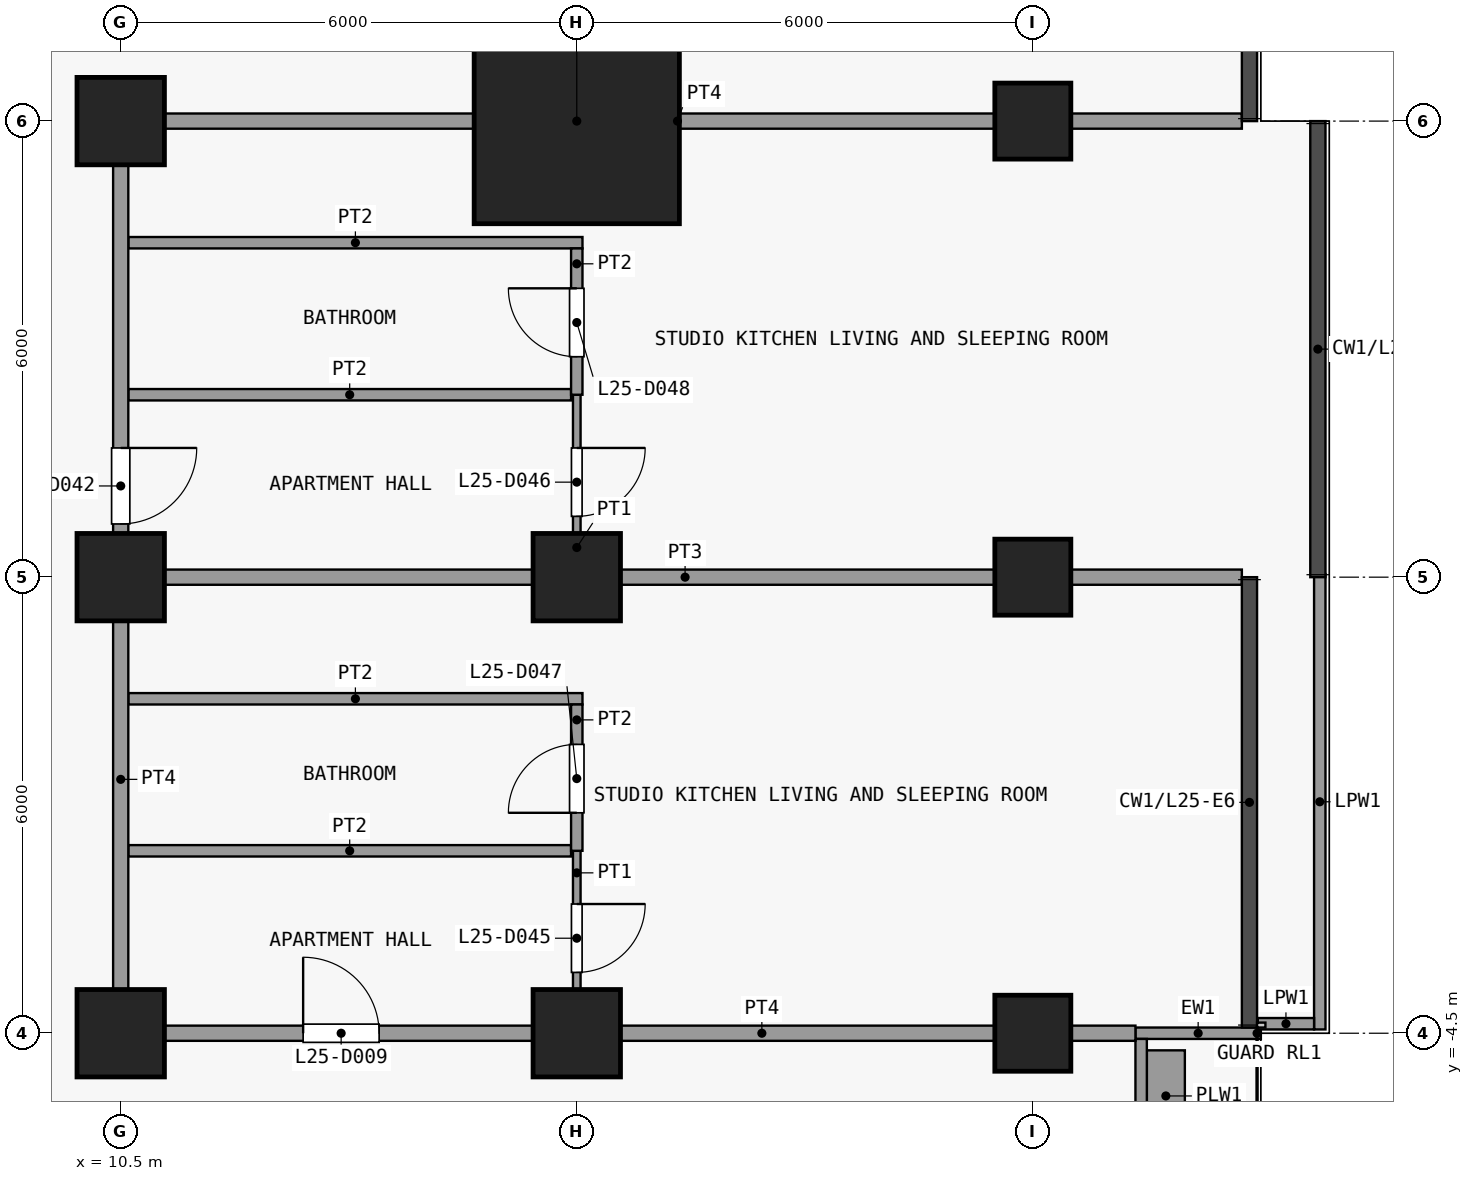
"""IFC4 building model, lengths in metres.
Left out: names, types, materials, properties, quantities, classifications, styles, units other than length and angle.
Written with IfcOpenShell. Run it as: python <this file> out.ifc"""

import sys

from ifc_helpers import new_model, si_unit, direction, frame, frame_2d, origin, origin_2d, place, context, subcontext, project, spatial, rectangle, extrude, element, fill, save


model = new_model("IFC4")
c1 = context("Model", 3, precision=1e-05, world=origin(), true_north=direction((0.0, 1.0)))
c2 = subcontext(c1, "Body", "Model", "MODEL_VIEW")
j1 = project(units=[si_unit("LENGTHUNIT", "METRE"), si_unit("PLANEANGLEUNIT", "RADIAN")], contexts=[c1])
p1 = place(None, origin())
s1 = spatial("IfcSite", under=j1, at=p1, CompositionType="ELEMENT")
p2 = place(p1, origin())
s2 = spatial("IfcBuilding", under=s1, at=p2, CompositionType="ELEMENT")
p3 = place(p2, frame((0.0, 0.0, 102.7)))
s3 = spatial("IfcBuildingStorey", under=s2, at=p3, CompositionType="ELEMENT", Elevation=102.7)
for number, where, z_axis, x_axis in (
    (1, (10.5, -4.5, 0.0), (0.0, 0.0, 1.0), (1.0, 0.0, 0.0)),
    (2, (10.5, 1.5, 0.0), (0.0, 0.0, 1.0), (1.0, 0.0, 0.0)),
    (3, (10.5, 7.5, 0.0), (0.0, 0.0, 1.0), (1.0, 0.0, 0.0)),
    (4, (16.5, -4.5, 0.0), (0.0, 0.0, 1.0), (1.0, 0.0, 0.0)),
    (5, (16.5, 1.5, 0.0), (0.0, 0.0, 1.0), (1.0, 0.0, 0.0)),
):
    element("IfcColumn", number, at=place(p3, frame(where, z_axis=z_axis, x_axis=x_axis)), inside=s3, PredefinedType="COLUMN", context=c2, shape_type="SweptSolid", body=[
        extrude(rectangle(XDim=1.15, YDim=1.15, at=origin_2d()), origin(), (0.0, 0.0, 1.0), 3.6),
    ])
p4 = place(p3, frame((16.5, 7.5, 0.0), z_axis=(0.0, 0.0, 1.0), x_axis=(1.0, 0.0, 0.0)))
e6 = element("IfcColumn", 6, at=p4, inside=s3, PredefinedType="COLUMN", context=c2, shape_type="SweptSolid", body=[
    extrude(rectangle(XDim=2.7, YDim=2.7, at=origin_2d()), origin(), (0.0, 0.0, 1.0), 3.6),
])
for number, where, z_axis, x_axis in (
    (7, (22.5, -4.5, 0.0), (0.0, 0.0, 1.0), (1.0, 0.0, 0.0)),
    (8, (22.5, 1.5, 0.0), (0.0, 0.0, 1.0), (1.0, 0.0, 0.0)),
    (9, (22.5, 7.5, 0.0), (0.0, 0.0, 1.0), (1.0, 0.0, 0.0)),
):
    element("IfcColumn", number, at=place(p3, frame(where, z_axis=z_axis, x_axis=x_axis)), inside=s3, PredefinedType="COLUMN", context=c2, shape_type="SweptSolid", body=[
        extrude(rectangle(XDim=1.0, YDim=1.0, at=origin_2d()), origin(), (0.0, 0.0, 1.0), 3.6),
    ])
p5 = place(p3, frame((23.85, -4.5, 0.0), z_axis=(0.0, 0.0, 1.0), x_axis=(1.0, 0.0, 0.0)))
e10 = element("IfcWall", 10, at=p5, inside=s3, PredefinedType="SOLIDWALL", context=c2, shape_type="SweptSolid", body=[
    extrude(rectangle(XDim=1.65, YDim=0.15, at=frame_2d((0.825, 0.0))), origin(), (0.0, 0.0, 1.0), 3.3),
])
p6 = place(p3, frame((23.925, -4.575, 0.0), z_axis=(0.0, 0.0, 1.0), x_axis=(0.0, -1.0, 0.0)))
e11 = element("IfcWall", 11, at=p6, inside=s3, PredefinedType="SOLIDWALL", context=c2, shape_type="SweptSolid", body=[
    extrude(rectangle(XDim=8.85, YDim=0.15, at=frame_2d((4.425, 0.0))), origin(), (0.0, 0.0, 1.0), 3.3),
])
p7 = place(p6, frame((5.525, 0.0, 0.0)))
e12 = element("IfcOpeningElement", 12, at=p7, cuts=e11, PredefinedType="OPENING", context=c2, shape_type="SweptSolid", body=[
    extrude(rectangle(XDim=1.2, YDim=2.4, at=frame_2d((0.6, 1.2))), frame((0.0, 0.085, 0.0), z_axis=(0.0, -1.0, 0.0), x_axis=(1.0, 0.0, 0.0)), (0.0, 0.0, 1.0), 0.17),
])
p8 = place(p6, frame((6.975, 0.0, 0.9)))
e13 = element("IfcOpeningElement", 13, at=p8, cuts=e11, PredefinedType="OPENING", context=c2, shape_type="SweptSolid", body=[
    extrude(rectangle(XDim=1.625, YDim=2.1, at=frame_2d((0.812, 1.05))), frame((0.0, 0.085, 0.0), z_axis=(0.0, -1.0, 0.0), x_axis=(1.0, 0.0, 0.0)), (0.0, 0.0, 1.0), 0.17),
])
p9 = place(p6, frame((1.263, 0.0, 0.9)))
e14 = element("IfcOpeningElement", 14, at=p9, cuts=e11, PredefinedType="OPENING", context=c2, shape_type="SweptSolid", body=[
    extrude(rectangle(XDim=1.812, YDim=2.1, at=frame_2d((0.906, 1.05))), frame((0.0, 0.085, 0.0), z_axis=(0.0, -1.0, 0.0), x_axis=(1.0, 0.0, 0.0)), (0.0, 0.0, 1.0), 0.17),
])
p10 = place(p3, frame((24.25, -5.925, 0.0), z_axis=(0.0, 0.0, 1.0), x_axis=(0.0, 1.0, 0.0)))
e15 = element("IfcWall", 15, at=p10, inside=s3, PredefinedType="USERDEFINED", context=c2, shape_type="SweptSolid", body=[
    extrude(rectangle(XDim=1.2, YDim=0.5, at=frame_2d((0.6, 0.0))), origin(), (0.0, 0.0, 1.0), 0.9),
])
p11 = place(p3, frame((26.275, 1.54, 0.0), z_axis=(0.0, 0.0, 1.0), x_axis=(0.0, -1.0, 0.0)))
e16 = element("IfcWall", 16, at=p11, inside=s3, PredefinedType="PARAPET", context=c2, shape_type="SweptSolid", body=[
    extrude(rectangle(XDim=5.99, YDim=0.15, at=frame_2d((2.995, 0.0))), origin(), (0.0, 0.0, 1.0), 1.15),
])
p12 = place(p3, frame((26.2, -4.375, 0.0), z_axis=(0.0, 0.0, 1.0), x_axis=(-1.0, 0.0, 0.0)))
e17 = element("IfcWall", 17, at=p12, inside=s3, PredefinedType="PARAPET", context=c2, shape_type="SweptSolid", body=[
    extrude(rectangle(XDim=0.74, YDim=0.15, at=frame_2d((0.37, 0.0))), origin(), (0.0, 0.0, 1.0), 1.15),
])
p13 = place(p3, frame((10.4, -4.5, 0.0), z_axis=(0.0, 0.0, 1.0), x_axis=(1.0, 0.0, 0.0)))
e18 = element("IfcWall", 18, at=p13, inside=s3, PredefinedType="PARTITIONING", context=c2, shape_type="SweptSolid", body=[
    extrude(rectangle(XDim=13.45, YDim=0.2, at=frame_2d((6.725, 0.0))), origin(), (0.0, 0.0, 1.0), 3.3),
])
p14 = place(p13, frame((2.5, 0.0, 0.0)))
e19 = element("IfcOpeningElement", 19, at=p14, cuts=e18, PredefinedType="OPENING", context=c2, shape_type="SweptSolid", body=[
    extrude(rectangle(XDim=1.0, YDim=2.1, at=frame_2d((0.5, 1.05))), frame((0.0, 0.11, 0.0), z_axis=(0.0, -1.0, 0.0), x_axis=(1.0, 0.0, 0.0)), (0.0, 0.0, 1.0), 0.22),
])
p15 = place(p3, frame((10.6, -2.1, 0.0), z_axis=(0.0, 0.0, 1.0), x_axis=(1.0, 0.0, 0.0)))
e20 = element("IfcWall", 20, at=p15, inside=s3, PredefinedType="PARTITIONING", context=c2, shape_type="SweptSolid", body=[
    extrude(rectangle(XDim=5.825, YDim=0.15, at=frame_2d((2.913, 0.0))), origin(), (0.0, 0.0, 1.0), 3.3),
])
p16 = place(p3, frame((10.6, -0.1, 0.0), z_axis=(0.0, 0.0, 1.0), x_axis=(1.0, 0.0, 0.0)))
e21 = element("IfcWall", 21, at=p16, inside=s3, PredefinedType="PARTITIONING", context=c2, shape_type="SweptSolid", body=[
    extrude(rectangle(XDim=5.975, YDim=0.15, at=frame_2d((2.987, 0.0))), origin(), (0.0, 0.0, 1.0), 3.3),
])
p17 = place(p3, frame((10.6, 1.5, 0.0), z_axis=(0.0, 0.0, 1.0), x_axis=(1.0, 0.0, 0.0)))
e22 = element("IfcWall", 22, at=p17, inside=s3, PredefinedType="PARTITIONING", context=c2, shape_type="SweptSolid", body=[
    extrude(rectangle(XDim=14.65, YDim=0.2, at=frame_2d((7.325, 0.0))), origin(), (0.0, 0.0, 1.0), 3.3),
])
p18 = place(p3, frame((10.6, 3.9, 0.0), z_axis=(0.0, 0.0, 1.0), x_axis=(1.0, 0.0, 0.0)))
e23 = element("IfcWall", 23, at=p18, inside=s3, PredefinedType="PARTITIONING", context=c2, shape_type="SweptSolid", body=[
    extrude(rectangle(XDim=5.825, YDim=0.15, at=frame_2d((2.913, 0.0))), origin(), (0.0, 0.0, 1.0), 3.3),
])
p19 = place(p3, frame((10.6, 5.9, 0.0), z_axis=(0.0, 0.0, 1.0), x_axis=(1.0, 0.0, 0.0)))
e24 = element("IfcWall", 24, at=p19, inside=s3, PredefinedType="PARTITIONING", context=c2, shape_type="SweptSolid", body=[
    extrude(rectangle(XDim=5.975, YDim=0.15, at=frame_2d((2.987, 0.0))), origin(), (0.0, 0.0, 1.0), 3.3),
])
p20 = place(p3, frame((10.4, 7.5, 0.0), z_axis=(0.0, 0.0, 1.0), x_axis=(1.0, 0.0, 0.0)))
e25 = element("IfcWall", 25, at=p20, inside=s3, PredefinedType="PARTITIONING", context=c2, shape_type="SweptSolid", body=[
    extrude(rectangle(XDim=14.85, YDim=0.2, at=frame_2d((7.425, 0.0))), origin(), (0.0, 0.0, 1.0), 3.3),
])
p21 = place(p3, frame((10.5, -4.4, 0.0), z_axis=(0.0, 0.0, 1.0), x_axis=(0.0, 1.0, 0.0)))
e26 = element("IfcWall", 26, at=p21, inside=s3, PredefinedType="PARTITIONING", context=c2, shape_type="SweptSolid", body=[
    extrude(rectangle(XDim=11.8, YDim=0.2, at=frame_2d((5.9, 0.0))), origin(), (0.0, 0.0, 1.0), 3.3),
])
p22 = place(p21, frame((6.6, 0.0, 0.0)))
e27 = element("IfcOpeningElement", 27, at=p22, cuts=e26, PredefinedType="OPENING", context=c2, shape_type="SweptSolid", body=[
    extrude(rectangle(XDim=1.0, YDim=2.1, at=frame_2d((0.5, 1.05))), frame((0.0, 0.11, 0.0), z_axis=(0.0, -1.0, 0.0), x_axis=(1.0, 0.0, 0.0)), (0.0, 0.0, 1.0), 0.22),
])
p23 = place(p3, frame((16.5, -4.4, 0.0), z_axis=(0.0, 0.0, 1.0), x_axis=(0.0, 1.0, 0.0)))
e28 = element("IfcWall", 28, at=p23, inside=s3, PredefinedType="PARTITIONING", context=c2, shape_type="SweptSolid", body=[
    extrude(rectangle(XDim=2.3, YDim=0.1, at=frame_2d((1.15, 0.0))), origin(), (0.0, 0.0, 1.0), 3.3),
])
p24 = place(p23, frame((0.7, 0.0, 0.0)))
e29 = element("IfcOpeningElement", 29, at=p24, cuts=e28, PredefinedType="OPENING", context=c2, shape_type="SweptSolid", body=[
    extrude(rectangle(XDim=0.9, YDim=2.1, at=frame_2d((0.45, 1.05))), frame((0.0, 0.06, 0.0), z_axis=(0.0, -1.0, 0.0), x_axis=(1.0, 0.0, 0.0)), (0.0, 0.0, 1.0), 0.12),
])
p25 = place(p3, frame((16.5, 1.6, 0.0), z_axis=(0.0, 0.0, 1.0), x_axis=(0.0, 1.0, 0.0)))
e30 = element("IfcWall", 30, at=p25, inside=s3, PredefinedType="PARTITIONING", context=c2, shape_type="SweptSolid", body=[
    extrude(rectangle(XDim=2.3, YDim=0.1, at=frame_2d((1.15, 0.0))), origin(), (0.0, 0.0, 1.0), 3.3),
])
p26 = place(p25, frame((0.7, 0.0, 0.0)))
e31 = element("IfcOpeningElement", 31, at=p26, cuts=e30, PredefinedType="OPENING", context=c2, shape_type="SweptSolid", body=[
    extrude(rectangle(XDim=0.9, YDim=2.1, at=frame_2d((0.45, 1.05))), frame((0.0, 0.06, 0.0), z_axis=(0.0, -1.0, 0.0), x_axis=(1.0, 0.0, 0.0)), (0.0, 0.0, 1.0), 0.12),
])
p27 = place(p3, frame((16.5, -2.1, 0.0), z_axis=(0.0, 0.0, 1.0), x_axis=(0.0, 1.0, 0.0)))
e32 = element("IfcWall", 32, at=p27, inside=s3, PredefinedType="PARTITIONING", context=c2, shape_type="SweptSolid", body=[
    extrude(rectangle(XDim=1.925, YDim=0.15, at=frame_2d((0.962, 0.0))), origin(), (0.0, 0.0, 1.0), 3.3),
])
p28 = place(p27, frame((0.5, 0.0, 0.0)))
e33 = element("IfcOpeningElement", 33, at=p28, cuts=e32, PredefinedType="OPENING", context=c2, shape_type="SweptSolid", body=[
    extrude(rectangle(XDim=0.9, YDim=2.1, at=frame_2d((0.45, 1.05))), frame((0.0, 0.085, 0.0), z_axis=(0.0, -1.0, 0.0), x_axis=(1.0, 0.0, 0.0)), (0.0, 0.0, 1.0), 0.17),
])
p29 = place(p3, frame((16.5, 3.9, 0.0), z_axis=(0.0, 0.0, 1.0), x_axis=(0.0, 1.0, 0.0)))
e34 = element("IfcWall", 34, at=p29, inside=s3, PredefinedType="PARTITIONING", context=c2, shape_type="SweptSolid", body=[
    extrude(rectangle(XDim=1.925, YDim=0.15, at=frame_2d((0.962, 0.0))), origin(), (0.0, 0.0, 1.0), 3.3),
])
p30 = place(p29, frame((0.5, 0.0, 0.0)))
e35 = element("IfcOpeningElement", 35, at=p30, cuts=e34, PredefinedType="OPENING", context=c2, shape_type="SweptSolid", body=[
    extrude(rectangle(XDim=0.9, YDim=2.1, at=frame_2d((0.45, 1.05))), frame((0.0, 0.085, 0.0), z_axis=(0.0, -1.0, 0.0), x_axis=(1.0, 0.0, 0.0)), (0.0, 0.0, 1.0), 0.17),
])
p31 = place(p14, origin())
e36 = element("IfcDoor", 36, at=p31, inside=s3, OperationType="SINGLE_SWING_RIGHT", PredefinedType="DOOR", context=c2, shape_type="SweptSolid", body=[
    extrude(rectangle(XDim=1.0, YDim=2.1, at=frame_2d((0.5, 1.05))), frame((0.0, 0.025, 0.0), z_axis=(0.0, -1.0, 0.0), x_axis=(1.0, 0.0, 0.0)), (0.0, 0.0, 1.0), 0.05),
])
fill(e19, e36)
p32 = place(p22, origin())
e37 = element("IfcDoor", 37, at=p32, inside=s3, OperationType="SINGLE_SWING_RIGHT", PredefinedType="DOOR", context=c2, shape_type="SweptSolid", body=[
    extrude(rectangle(XDim=1.0, YDim=2.1, at=frame_2d((0.5, 1.05))), frame((0.0, 0.025, 0.0), z_axis=(0.0, -1.0, 0.0), x_axis=(1.0, 0.0, 0.0)), (0.0, 0.0, 1.0), 0.05),
])
fill(e27, e37)
p33 = place(p24, origin())
e38 = element("IfcDoor", 38, at=p33, inside=s3, OperationType="SINGLE_SWING_RIGHT", PredefinedType="DOOR", context=c2, shape_type="SweptSolid", body=[
    extrude(rectangle(XDim=0.9, YDim=2.1, at=frame_2d((0.45, 1.05))), frame((0.0, 0.025, 0.0), z_axis=(0.0, -1.0, 0.0), x_axis=(1.0, 0.0, 0.0)), (0.0, 0.0, 1.0), 0.05),
])
fill(e29, e38)
p34 = place(p26, origin())
e39 = element("IfcDoor", 39, at=p34, inside=s3, OperationType="SINGLE_SWING_RIGHT", PredefinedType="DOOR", context=c2, shape_type="SweptSolid", body=[
    extrude(rectangle(XDim=0.9, YDim=2.1, at=frame_2d((0.45, 1.05))), frame((0.0, 0.025, 0.0), z_axis=(0.0, -1.0, 0.0), x_axis=(1.0, 0.0, 0.0)), (0.0, 0.0, 1.0), 0.05),
])
fill(e31, e39)
p35 = place(p28, origin())
e40 = element("IfcDoor", 40, at=p35, inside=s3, OperationType="SINGLE_SWING_RIGHT", PredefinedType="DOOR", context=c2, shape_type="SweptSolid", body=[
    extrude(rectangle(XDim=0.9, YDim=2.1, at=frame_2d((0.45, 1.05))), frame((0.0, 0.025, 0.0), z_axis=(0.0, -1.0, 0.0), x_axis=(1.0, 0.0, 0.0)), (0.0, 0.0, 1.0), 0.05),
])
fill(e33, e40)
p36 = place(p30, origin())
e41 = element("IfcDoor", 41, at=p36, inside=s3, OperationType="SINGLE_SWING_LEFT", PredefinedType="DOOR", context=c2, shape_type="SweptSolid", body=[
    extrude(rectangle(XDim=0.9, YDim=2.1, at=frame_2d((0.45, 1.05))), frame((0.0, 0.025, 0.0), z_axis=(0.0, -1.0, 0.0), x_axis=(1.0, 0.0, 0.0)), (0.0, 0.0, 1.0), 0.05),
])
fill(e35, e41)
save(model, sys.argv[1])
